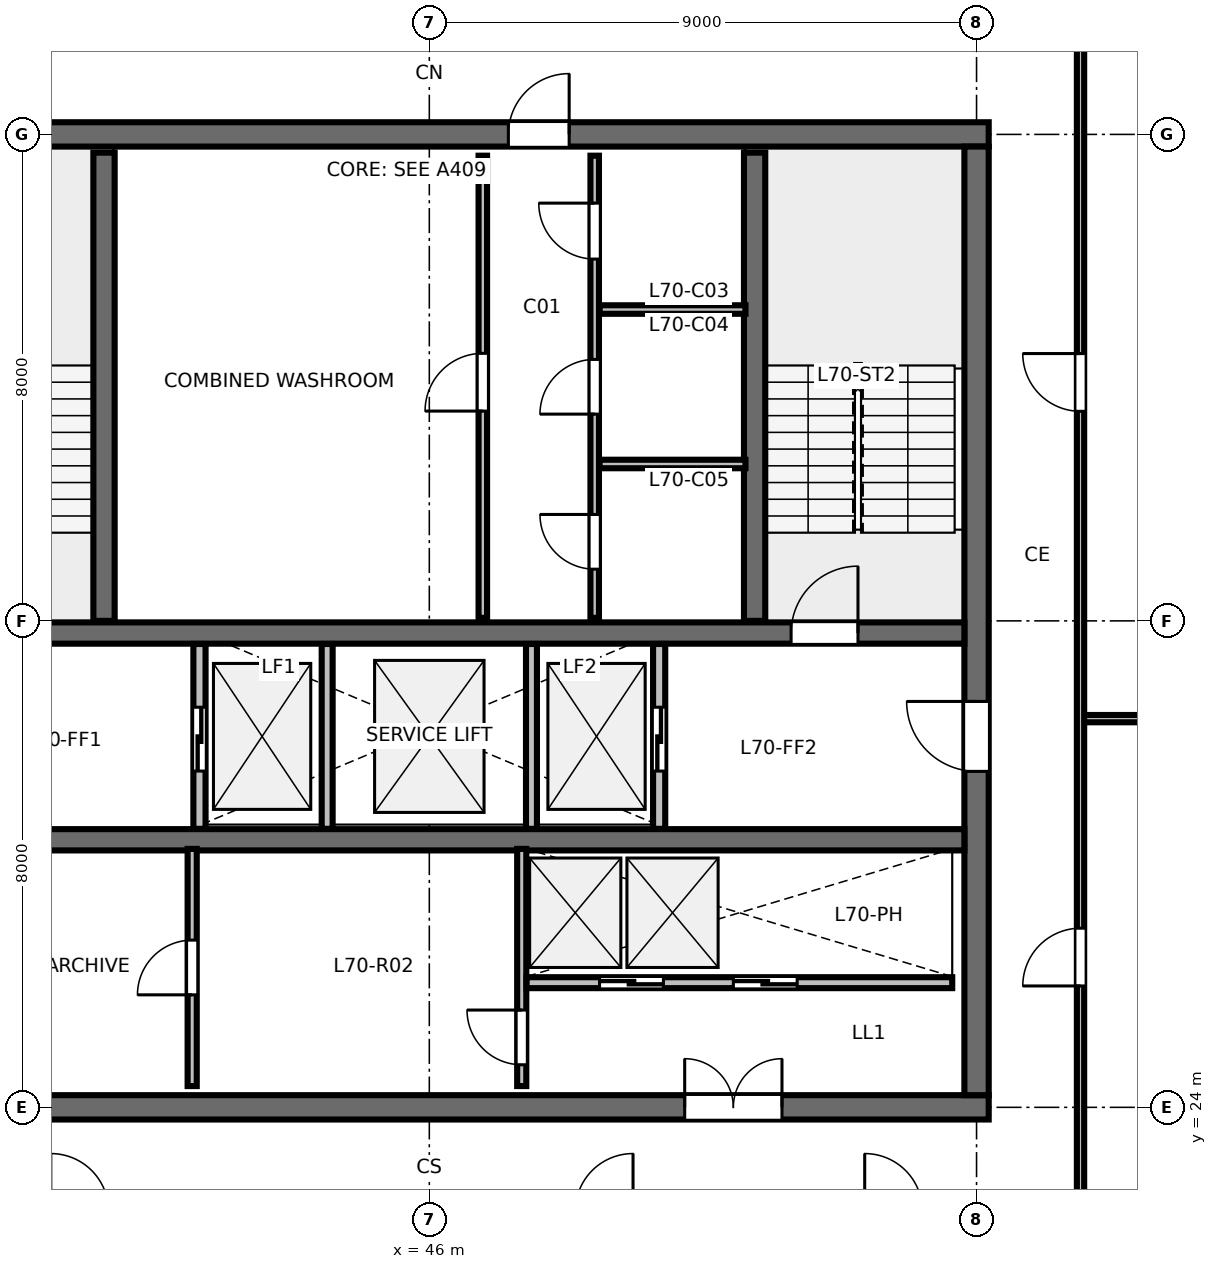
"""IFC4 building model, lengths in metres.
Left out: names, types, materials, properties, quantities, classifications, styles, units other than length and angle.
Written with IfcOpenShell. Run it as: python <this file> out.ifc"""

import sys

from ifc_helpers import new_model, si_unit, direction, frame, frame_2d, origin, place, context, subcontext, project, spatial, rectangle, extrude, element, fill, save


model = new_model("IFC4")
c1 = context("Model", 3, precision=1e-05, world=origin(), true_north=direction((0.0, 1.0)))
c2 = subcontext(c1, "Body", "Model", "MODEL_VIEW")
j1 = project(units=[si_unit("LENGTHUNIT", "METRE"), si_unit("PLANEANGLEUNIT", "RADIAN")], contexts=[c1])
p1 = place(None, origin())
s1 = spatial("IfcSite", under=j1, at=p1, CompositionType="ELEMENT")
p2 = place(p1, origin())
s2 = spatial("IfcBuilding", under=s1, at=p2, CompositionType="ELEMENT")
p3 = place(p2, frame((0.0, 0.0, 264.6)))
s3 = spatial("IfcBuildingStorey", under=s2, at=p3, CompositionType="ELEMENT", Elevation=264.6)
p4 = place(p3, frame((36.8, 24.0, 0.0), z_axis=(0.0, 0.0, 1.0), x_axis=(1.0, 0.0, 0.0)))
e1 = element("IfcWall", 1, at=p4, inside=s3, PredefinedType="SHEAR", context=c2, shape_type="SweptSolid", body=[
    extrude(rectangle(XDim=18.4, YDim=0.4, at=frame_2d((9.2, 0.0))), origin(), (0.0, 0.0, 1.0), 3.36),
])
p5 = place(p4, frame((13.4, 0.0, 0.0)))
e2 = element("IfcOpeningElement", 2, at=p5, cuts=e1, PredefinedType="OPENING", context=c2, shape_type="SweptSolid", body=[
    extrude(rectangle(XDim=1.6, YDim=2.15, at=frame_2d((0.8, 1.075))), frame((0.0, 0.21, 0.0), z_axis=(0.0, -1.0, 0.0), x_axis=(1.0, 0.0, 0.0)), (0.0, 0.0, 1.0), 0.42),
])
p6 = place(p3, frame((36.8, 40.0, 0.0), z_axis=(0.0, 0.0, 1.0), x_axis=(1.0, 0.0, 0.0)))
e3 = element("IfcWall", 3, at=p6, inside=s3, PredefinedType="SHEAR", context=c2, shape_type="SweptSolid", body=[
    extrude(rectangle(XDim=18.4, YDim=0.4, at=frame_2d((9.2, 0.0))), origin(), (0.0, 0.0, 1.0), 3.36),
])
p7 = place(p6, frame((10.5, 0.0, 0.0)))
e4 = element("IfcOpeningElement", 4, at=p7, cuts=e3, PredefinedType="OPENING", context=c2, shape_type="SweptSolid", body=[
    extrude(rectangle(XDim=1.0, YDim=2.15, at=frame_2d((0.5, 1.075))), frame((0.0, 0.21, 0.0), z_axis=(0.0, -1.0, 0.0), x_axis=(1.0, 0.0, 0.0)), (0.0, 0.0, 1.0), 0.42),
])
p8 = place(p3, frame((55.0, 24.2, 0.0), z_axis=(0.0, 0.0, 1.0), x_axis=(0.0, 1.0, 0.0)))
e5 = element("IfcWall", 5, at=p8, inside=s3, PredefinedType="SHEAR", context=c2, shape_type="SweptSolid", body=[
    extrude(rectangle(XDim=15.6, YDim=0.4, at=frame_2d((7.8, 0.0))), origin(), (0.0, 0.0, 1.0), 3.36),
])
p9 = place(p8, frame((5.325, 0.0, 0.0)))
e6 = element("IfcOpeningElement", 6, at=p9, cuts=e5, PredefinedType="OPENING", context=c2, shape_type="SweptSolid", body=[
    extrude(rectangle(XDim=1.15, YDim=2.15, at=frame_2d((0.575, 1.075))), frame((0.0, 0.21, 0.0), z_axis=(0.0, -1.0, 0.0), x_axis=(1.0, 0.0, 0.0)), (0.0, 0.0, 1.0), 0.42),
])
p10 = place(p3, frame((37.2, 31.8, 0.0), z_axis=(0.0, 0.0, 1.0), x_axis=(1.0, 0.0, 0.0)))
e7 = element("IfcWall", 7, at=p10, inside=s3, PredefinedType="SHEAR", context=c2, shape_type="SweptSolid", body=[
    extrude(rectangle(XDim=17.6, YDim=0.35, at=frame_2d((8.8, 0.0))), origin(), (0.0, 0.0, 1.0), 3.36),
])
p11 = place(p10, frame((0.85, 0.0, 0.0)))
e8 = element("IfcOpeningElement", 8, at=p11, cuts=e7, PredefinedType="OPENING", context=c2, shape_type="SweptSolid", body=[
    extrude(rectangle(XDim=1.1, YDim=2.15, at=frame_2d((0.55, 1.075))), frame((0.0, 0.185, 0.0), z_axis=(0.0, -1.0, 0.0), x_axis=(1.0, 0.0, 0.0)), (0.0, 0.0, 1.0), 0.37),
])
p12 = place(p10, frame((14.75, 0.0, 0.0)))
e9 = element("IfcOpeningElement", 9, at=p12, cuts=e7, PredefinedType="OPENING", context=c2, shape_type="SweptSolid", body=[
    extrude(rectangle(XDim=1.1, YDim=2.15, at=frame_2d((0.55, 1.075))), frame((0.0, 0.185, 0.0), z_axis=(0.0, -1.0, 0.0), x_axis=(1.0, 0.0, 0.0)), (0.0, 0.0, 1.0), 0.37),
])
p13 = place(p3, frame((37.2, 28.4, 0.0), z_axis=(0.0, 0.0, 1.0), x_axis=(1.0, 0.0, 0.0)))
e10 = element("IfcWall", 10, at=p13, inside=s3, PredefinedType="SHEAR", context=c2, shape_type="SweptSolid", body=[
    extrude(rectangle(XDim=17.6, YDim=0.35, at=frame_2d((8.8, 0.0))), origin(), (0.0, 0.0, 1.0), 3.36),
])
for number, where, z_axis, x_axis in (
    (11, (56.47, 15.168, 0.0), (0.0, 0.0, 1.0), (0.707, 0.707, 0.0)),
    (12, (64.228, 41.075, 0.0), (0.0, 0.0, 1.0), (-0.707, 0.707, 0.0)),
):
    element("IfcWall", number, at=place(p3, frame(where, z_axis=z_axis, x_axis=x_axis)), inside=s3, PredefinedType="STANDARD", context=c2, shape_type="SweptSolid", body=[
        extrude(rectangle(XDim=10.971, YDim=0.265, at=frame_2d((5.485, 0.0))), origin(), (0.0, 0.0, 1.0), 2.832),
    ])
for number, where, z_axis, x_axis in (
    (13, (40.65, 32.0, 0.0), (0.0, 0.0, 1.0), (0.0, 1.0, 0.0)),
    (14, (51.35, 32.0, 0.0), (0.0, 0.0, 1.0), (0.0, 1.0, 0.0)),
):
    element("IfcWall", number, at=place(p3, frame(where, z_axis=z_axis, x_axis=x_axis)), inside=s3, PredefinedType="SHEAR", context=c2, shape_type="SweptSolid", body=[
        extrude(rectangle(XDim=7.7, YDim=0.35, at=frame_2d((3.85, 0.0))), origin(), (0.0, 0.0, 1.0), 3.6),
    ])
p14 = place(p3, frame((46.88, 32.05, 0.0), z_axis=(0.0, 0.0, 1.0), x_axis=(0.0, 1.0, 0.0)))
e15 = element("IfcWall", 15, at=p14, inside=s3, PredefinedType="PARTITIONING", context=c2, shape_type="SweptSolid", body=[
    extrude(rectangle(XDim=7.6, YDim=0.14, at=frame_2d((3.8, 0.0))), origin(), (0.0, 0.0, 1.0), 3.375),
])
p15 = place(p14, frame((3.4, 0.0, 0.0)))
e16 = element("IfcOpeningElement", 16, at=p15, cuts=e15, PredefinedType="OPENING", context=c2, shape_type="SweptSolid", body=[
    extrude(rectangle(XDim=0.95, YDim=2.15, at=frame_2d((0.475, 1.075))), frame((0.0, 0.08, 0.0), z_axis=(0.0, -1.0, 0.0), x_axis=(1.0, 0.0, 0.0)), (0.0, 0.0, 1.0), 0.16),
])
p16 = place(p3, frame((48.72, 32.05, 0.0), z_axis=(0.0, 0.0, 1.0), x_axis=(0.0, 1.0, 0.0)))
e17 = element("IfcWall", 17, at=p16, inside=s3, PredefinedType="PARTITIONING", context=c2, shape_type="SweptSolid", body=[
    extrude(rectangle(XDim=7.6, YDim=0.14, at=frame_2d((3.8, 0.0))), origin(), (0.0, 0.0, 1.0), 3.375),
])
p17 = place(p16, frame((0.8, 0.0, 0.0)))
e18 = element("IfcOpeningElement", 18, at=p17, cuts=e17, PredefinedType="OPENING", context=c2, shape_type="SweptSolid", body=[
    extrude(rectangle(XDim=0.9, YDim=2.15, at=frame_2d((0.45, 1.075))), frame((0.0, 0.08, 0.0), z_axis=(0.0, -1.0, 0.0), x_axis=(1.0, 0.0, 0.0)), (0.0, 0.0, 1.0), 0.16),
])
p18 = place(p16, frame((3.35, 0.0, 0.0)))
e19 = element("IfcOpeningElement", 19, at=p18, cuts=e17, PredefinedType="OPENING", context=c2, shape_type="SweptSolid", body=[
    extrude(rectangle(XDim=0.9, YDim=2.15, at=frame_2d((0.45, 1.075))), frame((0.0, 0.08, 0.0), z_axis=(0.0, -1.0, 0.0), x_axis=(1.0, 0.0, 0.0)), (0.0, 0.0, 1.0), 0.16),
])
p19 = place(p16, frame((5.9, 0.0, 0.0)))
e20 = element("IfcOpeningElement", 20, at=p19, cuts=e17, PredefinedType="OPENING", context=c2, shape_type="SweptSolid", body=[
    extrude(rectangle(XDim=0.92, YDim=2.15, at=frame_2d((0.46, 1.075))), frame((0.0, 0.08, 0.0), z_axis=(0.0, -1.0, 0.0), x_axis=(1.0, 0.0, 0.0)), (0.0, 0.0, 1.0), 0.16),
])
for number, where, z_axis, x_axis in (
    (21, (48.8, 34.58, 0.0), (0.0, 0.0, 1.0), (1.0, 0.0, 0.0)),
    (22, (48.8, 37.12, 0.0), (0.0, 0.0, 1.0), (1.0, 0.0, 0.0)),
):
    element("IfcWall", number, at=place(p3, frame(where, z_axis=z_axis, x_axis=x_axis)), inside=s3, PredefinedType="PARTITIONING", context=c2, shape_type="SweptSolid", body=[
        extrude(rectangle(XDim=2.4, YDim=0.14, at=frame_2d((1.2, 0.0))), origin(), (0.0, 0.0, 1.0), 3.375),
    ])
p20 = place(p3, frame((42.22, 28.58, 0.0), z_axis=(0.0, 0.0, 1.0), x_axis=(0.0, 1.0, 0.0)))
e23 = element("IfcWall", 23, at=p20, inside=s3, PredefinedType="PARTITIONING", context=c2, shape_type="SweptSolid", body=[
    extrude(rectangle(XDim=3.04, YDim=0.2, at=frame_2d((1.52, 0.0))), origin(), (0.0, 0.0, 1.0), 3.375),
])
p21 = place(p20, frame((0.95, 0.0, 0.0)))
e24 = element("IfcOpeningElement", 24, at=p21, cuts=e23, PredefinedType="OPENING", context=c2, shape_type="SweptSolid", body=[
    extrude(rectangle(XDim=1.05, YDim=2.15, at=frame_2d((0.525, 1.075))), frame((0.0, 0.11, 0.0), z_axis=(0.0, -1.0, 0.0), x_axis=(1.0, 0.0, 0.0)), (0.0, 0.0, 1.0), 0.22),
])
p22 = place(p3, frame((49.78, 28.58, 0.0), z_axis=(0.0, 0.0, 1.0), x_axis=(0.0, 1.0, 0.0)))
e25 = element("IfcWall", 25, at=p22, inside=s3, PredefinedType="PARTITIONING", context=c2, shape_type="SweptSolid", body=[
    extrude(rectangle(XDim=3.04, YDim=0.2, at=frame_2d((1.52, 0.0))), origin(), (0.0, 0.0, 1.0), 3.375),
])
p23 = place(p22, frame((0.95, 0.0, 0.0)))
e26 = element("IfcOpeningElement", 26, at=p23, cuts=e25, PredefinedType="OPENING", context=c2, shape_type="SweptSolid", body=[
    extrude(rectangle(XDim=1.05, YDim=2.15, at=frame_2d((0.525, 1.075))), frame((0.0, 0.11, 0.0), z_axis=(0.0, -1.0, 0.0), x_axis=(1.0, 0.0, 0.0)), (0.0, 0.0, 1.0), 0.22),
])
for number, where, z_axis, x_axis in (
    (27, (44.32, 28.58, 0.0), (0.0, 0.0, 1.0), (0.0, 1.0, 0.0)),
    (28, (47.68, 28.58, 0.0), (0.0, 0.0, 1.0), (0.0, 1.0, 0.0)),
):
    element("IfcWall", number, at=place(p3, frame(where, z_axis=z_axis, x_axis=x_axis)), inside=s3, PredefinedType="PARTITIONING", context=c2, shape_type="SweptSolid", body=[
        extrude(rectangle(XDim=3.04, YDim=0.18, at=frame_2d((1.52, 0.0))), origin(), (0.0, 0.0, 1.0), 3.375),
    ])
p24 = place(p3, frame((42.1, 24.35, 0.0), z_axis=(0.0, 0.0, 1.0), x_axis=(0.0, 1.0, 0.0)))
e29 = element("IfcWall", 29, at=p24, inside=s3, PredefinedType="PARTITIONING", context=c2, shape_type="SweptSolid", body=[
    extrude(rectangle(XDim=3.9, YDim=0.15, at=frame_2d((1.95, 0.0))), origin(), (0.0, 0.0, 1.0), 3.375),
])
p25 = place(p24, frame((1.5, 0.0, 0.0)))
e30 = element("IfcOpeningElement", 30, at=p25, cuts=e29, PredefinedType="OPENING", context=c2, shape_type="SweptSolid", body=[
    extrude(rectangle(XDim=0.9, YDim=2.15, at=frame_2d((0.45, 1.075))), frame((0.0, 0.085, 0.0), z_axis=(0.0, -1.0, 0.0), x_axis=(1.0, 0.0, 0.0)), (0.0, 0.0, 1.0), 0.17),
])
p26 = place(p3, frame((47.52, 24.35, 0.0), z_axis=(0.0, 0.0, 1.0), x_axis=(0.0, 1.0, 0.0)))
e31 = element("IfcWall", 31, at=p26, inside=s3, PredefinedType="PARTITIONING", context=c2, shape_type="SweptSolid", body=[
    extrude(rectangle(XDim=3.9, YDim=0.15, at=frame_2d((1.95, 0.0))), origin(), (0.0, 0.0, 1.0), 3.375),
])
p27 = place(p26, frame((0.35, 0.0, 0.0)))
e32 = element("IfcOpeningElement", 32, at=p27, cuts=e31, PredefinedType="OPENING", context=c2, shape_type="SweptSolid", body=[
    extrude(rectangle(XDim=0.9, YDim=2.15, at=frame_2d((0.45, 1.075))), frame((0.0, 0.085, 0.0), z_axis=(0.0, -1.0, 0.0), x_axis=(1.0, 0.0, 0.0)), (0.0, 0.0, 1.0), 0.17),
])
p28 = place(p3, frame((47.6, 26.05, 0.0), z_axis=(0.0, 0.0, 1.0), x_axis=(1.0, 0.0, 0.0)))
e33 = element("IfcWall", 33, at=p28, inside=s3, PredefinedType="PARTITIONING", context=c2, shape_type="SweptSolid", body=[
    extrude(rectangle(XDim=7.0, YDim=0.18, at=frame_2d((3.5, 0.0))), origin(), (0.0, 0.0, 1.0), 3.375),
])
p29 = place(p28, frame((1.2, 0.0, 0.0)))
e34 = element("IfcOpeningElement", 34, at=p29, cuts=e33, PredefinedType="OPENING", context=c2, shape_type="SweptSolid", body=[
    extrude(rectangle(XDim=1.05, YDim=2.15, at=frame_2d((0.525, 1.075))), frame((0.0, 0.1, 0.0), z_axis=(0.0, -1.0, 0.0), x_axis=(1.0, 0.0, 0.0)), (0.0, 0.0, 1.0), 0.2),
])
p30 = place(p28, frame((3.4, 0.0, 0.0)))
e35 = element("IfcOpeningElement", 35, at=p30, cuts=e33, PredefinedType="OPENING", context=c2, shape_type="SweptSolid", body=[
    extrude(rectangle(XDim=1.05, YDim=2.15, at=frame_2d((0.525, 1.075))), frame((0.0, 0.1, 0.0), z_axis=(0.0, -1.0, 0.0), x_axis=(1.0, 0.0, 0.0)), (0.0, 0.0, 1.0), 0.2),
])
p31 = place(p3, frame((56.71, 30.392, 0.0), z_axis=(0.0, 0.0, 1.0), x_axis=(1.0, 0.0, 0.0)))
e36 = element("IfcWall", 36, at=p31, inside=s3, PredefinedType="PARTITIONING", context=c2, shape_type="SweptSolid", body=[
    extrude(rectangle(XDim=7.073, YDim=0.12, at=frame_2d((3.536, 0.0))), origin(), (0.0, 0.0, 1.0), 2.655),
])
p32 = place(p31, frame((1.4, 0.0, 0.0)))
e37 = element("IfcOpeningElement", 37, at=p32, cuts=e36, PredefinedType="OPENING", context=c2, shape_type="SweptSolid", body=[
    extrude(rectangle(XDim=0.9, YDim=2.15, at=frame_2d((0.45, 1.075))), frame((0.0, 0.07, 0.0), z_axis=(0.0, -1.0, 0.0), x_axis=(1.0, 0.0, 0.0)), (0.0, 0.0, 1.0), 0.14),
])
p33 = place(p3, frame((56.71, 22.35, 0.0), z_axis=(0.0, 0.0, 1.0), x_axis=(0.0, 1.0, 0.0)))
e38 = element("IfcWall", 38, at=p33, inside=s3, PredefinedType="PARTITIONING", context=c2, shape_type="SweptSolid", body=[
    extrude(rectangle(XDim=19.3, YDim=0.12, at=frame_2d((9.65, 0.0))), origin(), (0.0, 0.0, 1.0), 2.655),
])
p34 = place(p33, frame((3.646, 0.0, 0.0)))
e39 = element("IfcOpeningElement", 39, at=p34, cuts=e38, PredefinedType="OPENING", context=c2, shape_type="SweptSolid", body=[
    extrude(rectangle(XDim=0.95, YDim=2.15, at=frame_2d((0.475, 1.075))), frame((0.0, 0.07, 0.0), z_axis=(0.0, -1.0, 0.0), x_axis=(1.0, 0.0, 0.0)), (0.0, 0.0, 1.0), 0.14),
])
p35 = place(p33, frame((13.096, 0.0, 0.0)))
e40 = element("IfcOpeningElement", 40, at=p35, cuts=e38, PredefinedType="OPENING", context=c2, shape_type="SweptSolid", body=[
    extrude(rectangle(XDim=0.95, YDim=2.15, at=frame_2d((0.475, 1.075))), frame((0.0, 0.07, 0.0), z_axis=(0.0, -1.0, 0.0), x_axis=(1.0, 0.0, 0.0)), (0.0, 0.0, 1.0), 0.14),
])
p36 = place(p12, origin())
e41 = element("IfcDoor", 41, at=p36, inside=s3, OperationType="SINGLE_SWING_RIGHT", PredefinedType="DOOR", context=c2, shape_type="SweptSolid", body=[
    extrude(rectangle(XDim=1.1, YDim=2.15, at=frame_2d((0.55, 1.075))), frame((0.0, 0.025, 0.0), z_axis=(0.0, -1.0, 0.0), x_axis=(1.0, 0.0, 0.0)), (0.0, 0.0, 1.0), 0.05),
])
fill(e9, e41)
p37 = place(p7, origin())
e42 = element("IfcDoor", 42, at=p37, inside=s3, OperationType="SINGLE_SWING_RIGHT", PredefinedType="DOOR", context=c2, shape_type="SweptSolid", body=[
    extrude(rectangle(XDim=1.0, YDim=2.15, at=frame_2d((0.5, 1.075))), frame((0.0, 0.025, 0.0), z_axis=(0.0, -1.0, 0.0), x_axis=(1.0, 0.0, 0.0)), (0.0, 0.0, 1.0), 0.05),
])
fill(e4, e42)
p38 = place(p9, origin())
e43 = element("IfcDoor", 43, at=p38, inside=s3, OperationType="SINGLE_SWING_RIGHT", PredefinedType="DOOR", context=c2, shape_type="SweptSolid", body=[
    extrude(rectangle(XDim=1.15, YDim=2.15, at=frame_2d((0.575, 1.075))), frame((0.0, 0.025, 0.0), z_axis=(0.0, -1.0, 0.0), x_axis=(1.0, 0.0, 0.0)), (0.0, 0.0, 1.0), 0.05),
])
fill(e6, e43)
p39 = place(p5, origin())
e44 = element("IfcDoor", 44, at=p39, inside=s3, OperationType="DOUBLE_DOOR_SINGLE_SWING", PredefinedType="DOOR", context=c2, shape_type="SweptSolid", body=[
    extrude(rectangle(XDim=1.6, YDim=2.15, at=frame_2d((0.8, 1.075))), frame((0.0, 0.025, 0.0), z_axis=(0.0, -1.0, 0.0), x_axis=(1.0, 0.0, 0.0)), (0.0, 0.0, 1.0), 0.05),
])
fill(e2, e44)
p40 = place(p15, origin())
e45 = element("IfcDoor", 45, at=p40, inside=s3, OperationType="SINGLE_SWING_LEFT", PredefinedType="DOOR", context=c2, shape_type="SweptSolid", body=[
    extrude(rectangle(XDim=0.95, YDim=2.15, at=frame_2d((0.475, 1.075))), frame((0.0, 0.025, 0.0), z_axis=(0.0, -1.0, 0.0), x_axis=(1.0, 0.0, 0.0)), (0.0, 0.0, 1.0), 0.05),
])
fill(e16, e45)
p41 = place(p17, origin())
e46 = element("IfcDoor", 46, at=p41, inside=s3, OperationType="SINGLE_SWING_RIGHT", PredefinedType="DOOR", context=c2, shape_type="SweptSolid", body=[
    extrude(rectangle(XDim=0.9, YDim=2.15, at=frame_2d((0.45, 1.075))), frame((0.0, 0.025, 0.0), z_axis=(0.0, -1.0, 0.0), x_axis=(1.0, 0.0, 0.0)), (0.0, 0.0, 1.0), 0.05),
])
fill(e18, e46)
p42 = place(p18, origin())
e47 = element("IfcDoor", 47, at=p42, inside=s3, OperationType="SINGLE_SWING_LEFT", PredefinedType="DOOR", context=c2, shape_type="SweptSolid", body=[
    extrude(rectangle(XDim=0.9, YDim=2.15, at=frame_2d((0.45, 1.075))), frame((0.0, 0.025, 0.0), z_axis=(0.0, -1.0, 0.0), x_axis=(1.0, 0.0, 0.0)), (0.0, 0.0, 1.0), 0.05),
])
fill(e19, e47)
p43 = place(p19, origin())
e48 = element("IfcDoor", 48, at=p43, inside=s3, OperationType="SINGLE_SWING_RIGHT", PredefinedType="DOOR", context=c2, shape_type="SweptSolid", body=[
    extrude(rectangle(XDim=0.92, YDim=2.15, at=frame_2d((0.46, 1.075))), frame((0.0, 0.025, 0.0), z_axis=(0.0, -1.0, 0.0), x_axis=(1.0, 0.0, 0.0)), (0.0, 0.0, 1.0), 0.05),
])
fill(e20, e48)
p44 = place(p21, origin())
e49 = element("IfcDoor", 49, at=p44, inside=s3, OperationType="SLIDING_TO_LEFT", PredefinedType="DOOR", context=c2, shape_type="SweptSolid", body=[
    extrude(rectangle(XDim=1.05, YDim=2.15, at=frame_2d((0.525, 1.075))), frame((0.0, 0.025, 0.0), z_axis=(0.0, -1.0, 0.0), x_axis=(1.0, 0.0, 0.0)), (0.0, 0.0, 1.0), 0.05),
])
fill(e24, e49)
p45 = place(p23, origin())
e50 = element("IfcDoor", 50, at=p45, inside=s3, OperationType="SLIDING_TO_RIGHT", PredefinedType="DOOR", context=c2, shape_type="SweptSolid", body=[
    extrude(rectangle(XDim=1.05, YDim=2.15, at=frame_2d((0.525, 1.075))), frame((0.0, 0.025, 0.0), z_axis=(0.0, -1.0, 0.0), x_axis=(1.0, 0.0, 0.0)), (0.0, 0.0, 1.0), 0.05),
])
fill(e26, e50)
p46 = place(p25, origin())
e51 = element("IfcDoor", 51, at=p46, inside=s3, OperationType="SINGLE_SWING_LEFT", PredefinedType="DOOR", context=c2, shape_type="SweptSolid", body=[
    extrude(rectangle(XDim=0.9, YDim=2.15, at=frame_2d((0.45, 1.075))), frame((0.0, 0.025, 0.0), z_axis=(0.0, -1.0, 0.0), x_axis=(1.0, 0.0, 0.0)), (0.0, 0.0, 1.0), 0.05),
])
fill(e30, e51)
p47 = place(p27, origin())
e52 = element("IfcDoor", 52, at=p47, inside=s3, OperationType="SINGLE_SWING_RIGHT", PredefinedType="DOOR", context=c2, shape_type="SweptSolid", body=[
    extrude(rectangle(XDim=0.9, YDim=2.15, at=frame_2d((0.45, 1.075))), frame((0.0, 0.025, 0.0), z_axis=(0.0, -1.0, 0.0), x_axis=(1.0, 0.0, 0.0)), (0.0, 0.0, 1.0), 0.05),
])
fill(e32, e52)
p48 = place(p29, origin())
e53 = element("IfcDoor", 53, at=p48, inside=s3, OperationType="SLIDING_TO_LEFT", PredefinedType="DOOR", context=c2, shape_type="SweptSolid", body=[
    extrude(rectangle(XDim=1.05, YDim=2.15, at=frame_2d((0.525, 1.075))), frame((0.0, 0.025, 0.0), z_axis=(0.0, -1.0, 0.0), x_axis=(1.0, 0.0, 0.0)), (0.0, 0.0, 1.0), 0.05),
])
fill(e34, e53)
p49 = place(p30, origin())
e54 = element("IfcDoor", 54, at=p49, inside=s3, OperationType="SLIDING_TO_RIGHT", PredefinedType="DOOR", context=c2, shape_type="SweptSolid", body=[
    extrude(rectangle(XDim=1.05, YDim=2.15, at=frame_2d((0.525, 1.075))), frame((0.0, 0.025, 0.0), z_axis=(0.0, -1.0, 0.0), x_axis=(1.0, 0.0, 0.0)), (0.0, 0.0, 1.0), 0.05),
])
fill(e35, e54)
p50 = place(p34, origin())
e55 = element("IfcDoor", 55, at=p50, inside=s3, OperationType="SINGLE_SWING_LEFT", PredefinedType="DOOR", context=c2, shape_type="SweptSolid", body=[
    extrude(rectangle(XDim=0.95, YDim=2.15, at=frame_2d((0.475, 1.075))), frame((0.0, 0.025, 0.0), z_axis=(0.0, -1.0, 0.0), x_axis=(1.0, 0.0, 0.0)), (0.0, 0.0, 1.0), 0.05),
])
fill(e39, e55)
p51 = place(p35, origin())
e56 = element("IfcDoor", 56, at=p51, inside=s3, OperationType="SINGLE_SWING_RIGHT", PredefinedType="DOOR", context=c2, shape_type="SweptSolid", body=[
    extrude(rectangle(XDim=0.95, YDim=2.15, at=frame_2d((0.475, 1.075))), frame((0.0, 0.025, 0.0), z_axis=(0.0, -1.0, 0.0), x_axis=(1.0, 0.0, 0.0)), (0.0, 0.0, 1.0), 0.05),
])
fill(e40, e56)
save(model, sys.argv[1])
